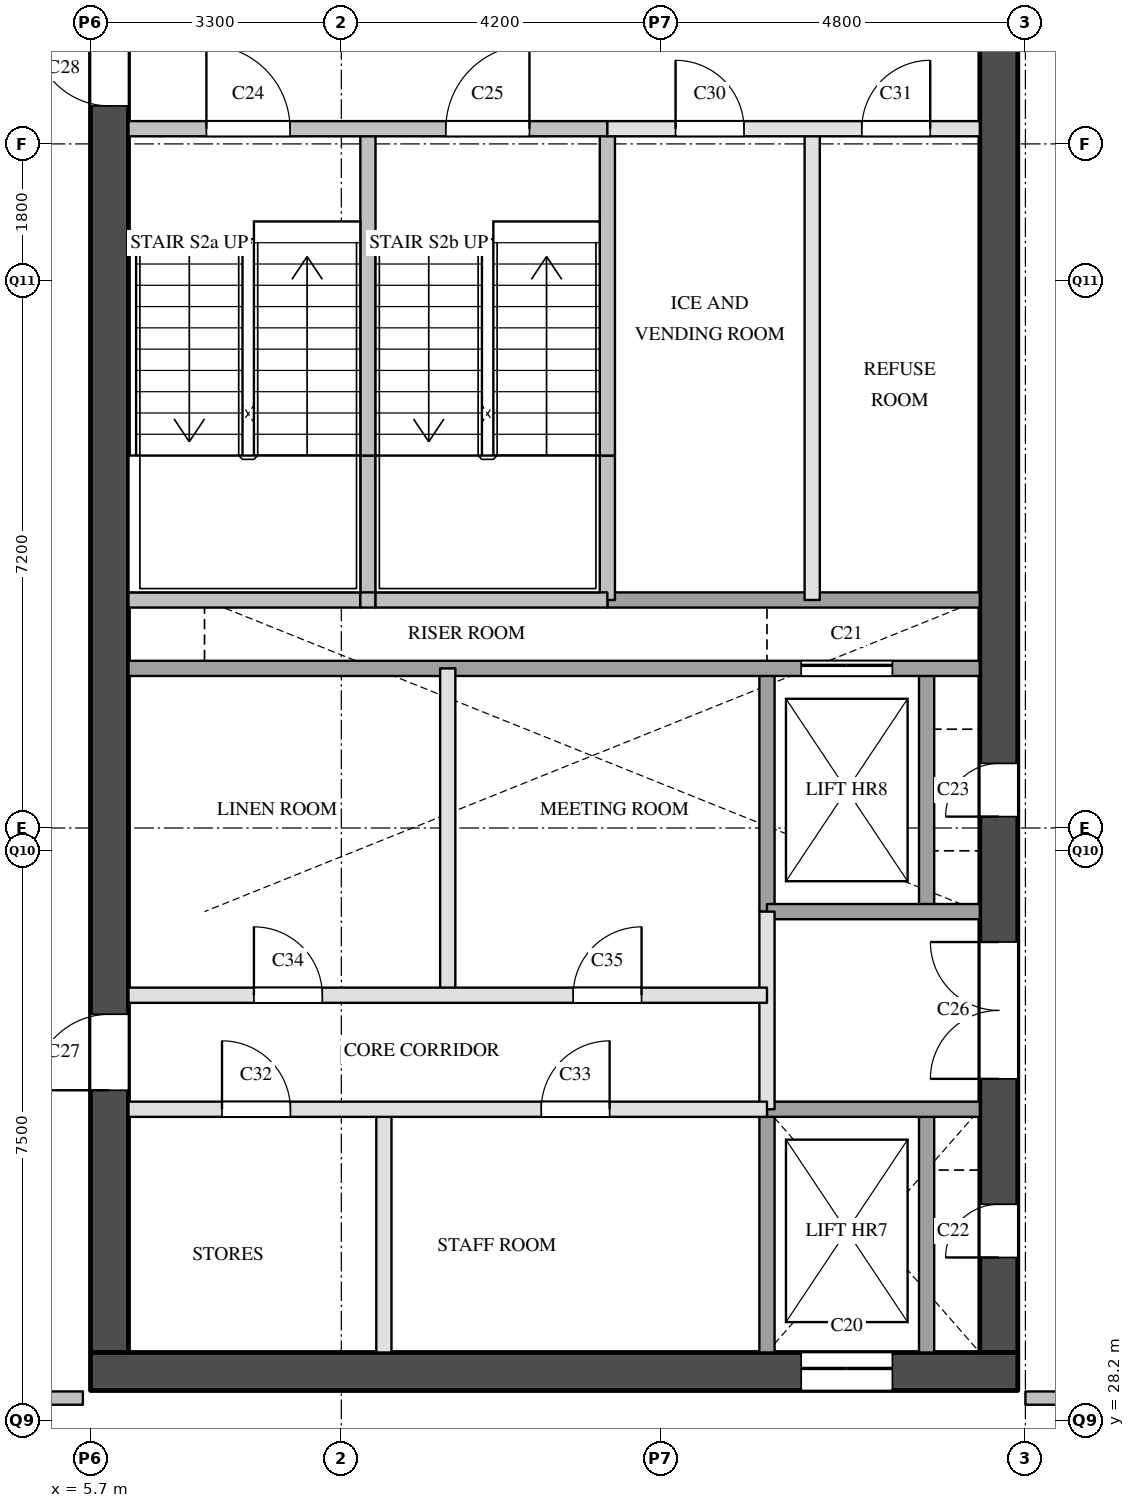
"""IFC4 building model, lengths in metres.
Left out: names, types, materials, properties, quantities, classifications, styles, units other than length and angle.
Written with IfcOpenShell. Run it as: python <this file> out.ifc"""

import sys

from ifc_helpers import new_model, si_unit, direction, frame, frame_2d, origin, place, context, subcontext, project, spatial, rectangle, extrude, element, fill, save


model = new_model("IFC4")
c1 = context("Model", 3, precision=1e-05, world=origin(), true_north=direction((0.0, 1.0)))
c2 = subcontext(c1, "Body", "Model", "MODEL_VIEW")
j1 = project(units=[si_unit("LENGTHUNIT", "METRE"), si_unit("PLANEANGLEUNIT", "RADIAN")], contexts=[c1])
p1 = place(None, origin())
s1 = spatial("IfcSite", under=j1, at=p1, CompositionType="ELEMENT")
p2 = place(p1, origin())
s2 = spatial("IfcBuilding", under=s1, at=p2, CompositionType="ELEMENT")
p3 = place(p2, frame((0.0, 0.0, 134.9)))
s3 = spatial("IfcBuildingStorey", under=s2, at=p3, CompositionType="ELEMENT", Elevation=134.9)
p4 = place(p3, frame((5.7, 28.85, 0.0), z_axis=(0.0, 0.0, 1.0), x_axis=(1.0, 0.0, 0.0)))
e1 = element("IfcWall", 1, at=p4, inside=s3, PredefinedType="SHEAR", context=c2, shape_type="SweptSolid", body=[
    extrude(rectangle(XDim=12.2, YDim=0.5, at=frame_2d((6.1, 0.0))), origin(), (0.0, 0.0, 1.0), 3.6),
])
p5 = place(p4, frame((9.35, 0.0, 0.0)))
e2 = element("IfcOpeningElement", 2, at=p5, cuts=e1, PredefinedType="OPENING", context=c2, shape_type="SweptSolid", body=[
    extrude(rectangle(XDim=1.2, YDim=2.1, at=frame_2d((0.6, 1.05))), frame((0.0, 0.26, 0.0), z_axis=(0.0, -1.0, 0.0), x_axis=(1.0, 0.0, 0.0)), (0.0, 0.0, 1.0), 0.52),
])
p6 = place(p3, frame((5.95, 29.1, 0.0), z_axis=(0.0, 0.0, 1.0), x_axis=(0.0, 1.0, 0.0)))
e3 = element("IfcWall", 3, at=p6, inside=s3, PredefinedType="SHEAR", context=c2, shape_type="SweptSolid", body=[
    extrude(rectangle(XDim=20.3, YDim=0.5, at=frame_2d((10.15, 0.0))), origin(), (0.0, 0.0, 1.0), 3.6),
])
p7 = place(p6, frame((3.45, 0.0, 0.0)))
e4 = element("IfcOpeningElement", 4, at=p7, cuts=e3, PredefinedType="OPENING", context=c2, shape_type="SweptSolid", body=[
    extrude(rectangle(XDim=1.0, YDim=2.1, at=frame_2d((0.5, 1.05))), frame((0.0, 0.26, 0.0), z_axis=(0.0, -1.0, 0.0), x_axis=(1.0, 0.0, 0.0)), (0.0, 0.0, 1.0), 0.52),
])
p8 = place(p6, frame((16.4, 0.0, 0.0)))
e5 = element("IfcOpeningElement", 5, at=p8, cuts=e3, PredefinedType="OPENING", context=c2, shape_type="SweptSolid", body=[
    extrude(rectangle(XDim=1.0, YDim=2.1, at=frame_2d((0.5, 1.05))), frame((0.0, 0.26, 0.0), z_axis=(0.0, -1.0, 0.0), x_axis=(1.0, 0.0, 0.0)), (0.0, 0.0, 1.0), 0.52),
])
p9 = place(p3, frame((17.65, 29.1, 0.0), z_axis=(0.0, 0.0, 1.0), x_axis=(0.0, 1.0, 0.0)))
e6 = element("IfcWall", 6, at=p9, inside=s3, PredefinedType="SHEAR", context=c2, shape_type="SweptSolid", body=[
    extrude(rectangle(XDim=20.3, YDim=0.5, at=frame_2d((10.15, 0.0))), origin(), (0.0, 0.0, 1.0), 3.6),
])
p10 = place(p9, frame((1.25, 0.0, 0.0)))
e7 = element("IfcOpeningElement", 7, at=p10, cuts=e6, PredefinedType="OPENING", context=c2, shape_type="SweptSolid", body=[
    extrude(rectangle(XDim=0.7, YDim=2.1, at=frame_2d((0.35, 1.05))), frame((0.0, 0.26, 0.0), z_axis=(0.0, -1.0, 0.0), x_axis=(1.0, 0.0, 0.0)), (0.0, 0.0, 1.0), 0.52),
])
p11 = place(p9, frame((7.05, 0.0, 0.0)))
e8 = element("IfcOpeningElement", 8, at=p11, cuts=e6, PredefinedType="OPENING", context=c2, shape_type="SweptSolid", body=[
    extrude(rectangle(XDim=0.7, YDim=2.1, at=frame_2d((0.35, 1.05))), frame((0.0, 0.26, 0.0), z_axis=(0.0, -1.0, 0.0), x_axis=(1.0, 0.0, 0.0)), (0.0, 0.0, 1.0), 0.52),
])
p12 = place(p9, frame((3.6, 0.0, 0.0)))
e9 = element("IfcOpeningElement", 9, at=p12, cuts=e6, PredefinedType="OPENING", context=c2, shape_type="SweptSolid", body=[
    extrude(rectangle(XDim=1.8, YDim=2.1, at=frame_2d((0.9, 1.05))), frame((0.0, 0.26, 0.0), z_axis=(0.0, -1.0, 0.0), x_axis=(1.0, 0.0, 0.0)), (0.0, 0.0, 1.0), 0.52),
])
p13 = place(p3, frame((9.35, 39.0, 0.0), z_axis=(0.0, 0.0, 1.0), x_axis=(0.0, 1.0, 0.0)))
e10 = element("IfcWall", 10, at=p13, inside=s3, PredefinedType="SOLIDWALL", context=c2, shape_type="SweptSolid", body=[
    extrude(rectangle(XDim=1.9, YDim=0.2, at=frame_2d((0.95, 0.0))), origin(), (0.0, 0.0, 1.0), 3.6),
])
p14 = place(p3, frame((9.35, 40.9, 0.0), z_axis=(0.0, 0.0, 1.0), x_axis=(0.0, 1.0, 0.0)))
e11 = element("IfcWall", 11, at=p14, inside=s3, PredefinedType="SOLIDWALL", context=c2, shape_type="SweptSolid", body=[
    extrude(rectangle(XDim=4.3, YDim=0.2, at=frame_2d((2.15, 0.0))), origin(), (0.0, 0.0, 1.0), 3.6),
])
p15 = place(p3, frame((9.56, 29.1, 0.0), z_axis=(0.0, 0.0, 1.0), x_axis=(0.0, 1.0, 0.0)))
e12 = element("IfcWall", 12, at=p15, inside=s3, PredefinedType="PARTITIONING", context=c2, shape_type="SweptSolid", body=[
    extrude(rectangle(XDim=3.2, YDim=0.2, at=frame_2d((1.6, 0.0))), origin(), (0.0, 0.0, 1.0), 3.6),
])
p16 = place(p3, frame((10.4, 33.8, 0.0), z_axis=(0.0, 0.0, 1.0), x_axis=(0.0, 1.0, 0.0)))
e13 = element("IfcWall", 13, at=p16, inside=s3, PredefinedType="PARTITIONING", context=c2, shape_type="SweptSolid", body=[
    extrude(rectangle(XDim=4.3, YDim=0.2, at=frame_2d((2.15, 0.0))), origin(), (0.0, 0.0, 1.0), 3.6),
])
p17 = place(p3, frame((12.5, 39.0, 0.0), z_axis=(0.0, 0.0, 1.0), x_axis=(0.0, 1.0, 0.0)))
e14 = element("IfcWall", 14, at=p17, inside=s3, PredefinedType="SOLIDWALL", context=c2, shape_type="SweptSolid", body=[
    extrude(rectangle(XDim=1.9, YDim=0.2, at=frame_2d((0.95, 0.0))), origin(), (0.0, 0.0, 1.0), 3.6),
])
p18 = place(p3, frame((12.5, 40.9, 0.0), z_axis=(0.0, 0.0, 1.0), x_axis=(0.0, 1.0, 0.0)))
e15 = element("IfcWall", 15, at=p18, inside=s3, PredefinedType="SOLIDWALL", context=c2, shape_type="SweptSolid", body=[
    extrude(rectangle(XDim=4.3, YDim=0.2, at=frame_2d((2.15, 0.0))), origin(), (0.0, 0.0, 1.0), 3.6),
])
p19 = place(p3, frame((14.6, 32.3, 0.0), z_axis=(0.0, 0.0, 1.0), x_axis=(0.0, 1.0, 0.0)))
e16 = element("IfcWall", 16, at=p19, inside=s3, PredefinedType="PARTITIONING", context=c2, shape_type="SweptSolid", body=[
    extrude(rectangle(XDim=2.6, YDim=0.2, at=frame_2d((1.3, 0.0))), origin(), (0.0, 0.0, 1.0), 3.6),
])
p20 = place(p3, frame((14.6, 29.1, 0.0), z_axis=(0.0, 0.0, 1.0), x_axis=(0.0, 1.0, 0.0)))
e17 = element("IfcWall", 17, at=p20, inside=s3, PredefinedType="SOLIDWALL", context=c2, shape_type="SweptSolid", body=[
    extrude(rectangle(XDim=3.2, YDim=0.2, at=frame_2d((1.6, 0.0))), origin(), (0.0, 0.0, 1.0), 3.6),
])
p21 = place(p3, frame((14.6, 34.9, 0.0), z_axis=(0.0, 0.0, 1.0), x_axis=(0.0, 1.0, 0.0)))
e18 = element("IfcWall", 18, at=p21, inside=s3, PredefinedType="SOLIDWALL", context=c2, shape_type="SweptSolid", body=[
    extrude(rectangle(XDim=3.2, YDim=0.2, at=frame_2d((1.6, 0.0))), origin(), (0.0, 0.0, 1.0), 3.6),
])
p22 = place(p3, frame((15.195, 39.0, 0.0), z_axis=(0.0, 0.0, 1.0), x_axis=(0.0, 1.0, 0.0)))
e19 = element("IfcWall", 19, at=p22, inside=s3, PredefinedType="PARTITIONING", context=c2, shape_type="SweptSolid", body=[
    extrude(rectangle(XDim=6.2, YDim=0.2, at=frame_2d((3.1, 0.0))), origin(), (0.0, 0.0, 1.0), 3.6),
])
p23 = place(p3, frame((16.7, 29.1, 0.0), z_axis=(0.0, 0.0, 1.0), x_axis=(0.0, 1.0, 0.0)))
e20 = element("IfcWall", 20, at=p23, inside=s3, PredefinedType="SOLIDWALL", context=c2, shape_type="SweptSolid", body=[
    extrude(rectangle(XDim=3.2, YDim=0.2, at=frame_2d((1.6, 0.0))), origin(), (0.0, 0.0, 1.0), 3.6),
])
p24 = place(p3, frame((16.7, 34.9, 0.0), z_axis=(0.0, 0.0, 1.0), x_axis=(0.0, 1.0, 0.0)))
e21 = element("IfcWall", 21, at=p24, inside=s3, PredefinedType="SOLIDWALL", context=c2, shape_type="SweptSolid", body=[
    extrude(rectangle(XDim=3.2, YDim=0.2, at=frame_2d((1.6, 0.0))), origin(), (0.0, 0.0, 1.0), 3.6),
])
p25 = place(p3, frame((6.2, 32.3, 0.0), z_axis=(0.0, 0.0, 1.0), x_axis=(1.0, 0.0, 0.0)))
e22 = element("IfcWall", 22, at=p25, inside=s3, PredefinedType="PARTITIONING", context=c2, shape_type="SweptSolid", body=[
    extrude(rectangle(XDim=8.4, YDim=0.2, at=frame_2d((4.2, 0.0))), origin(), (0.0, 0.0, 1.0), 3.6),
])
p26 = place(p25, frame((1.23, 0.0, 0.0)))
e23 = element("IfcOpeningElement", 23, at=p26, cuts=e22, PredefinedType="OPENING", context=c2, shape_type="SweptSolid", body=[
    extrude(rectangle(XDim=0.9, YDim=2.1, at=frame_2d((0.45, 1.05))), frame((0.0, 0.11, 0.0), z_axis=(0.0, -1.0, 0.0), x_axis=(1.0, 0.0, 0.0)), (0.0, 0.0, 1.0), 0.22),
])
p27 = place(p25, frame((5.43, 0.0, 0.0)))
e24 = element("IfcOpeningElement", 24, at=p27, cuts=e22, PredefinedType="OPENING", context=c2, shape_type="SweptSolid", body=[
    extrude(rectangle(XDim=0.9, YDim=2.1, at=frame_2d((0.45, 1.05))), frame((0.0, 0.11, 0.0), z_axis=(0.0, -1.0, 0.0), x_axis=(1.0, 0.0, 0.0)), (0.0, 0.0, 1.0), 0.22),
])
p28 = place(p3, frame((14.6, 32.3, 0.0), z_axis=(0.0, 0.0, 1.0), x_axis=(1.0, 0.0, 0.0)))
e25 = element("IfcWall", 25, at=p28, inside=s3, PredefinedType="SOLIDWALL", context=c2, shape_type="SweptSolid", body=[
    extrude(rectangle(XDim=2.8, YDim=0.2, at=frame_2d((1.4, 0.0))), origin(), (0.0, 0.0, 1.0), 3.6),
])
p29 = place(p3, frame((6.2, 33.8, 0.0), z_axis=(0.0, 0.0, 1.0), x_axis=(1.0, 0.0, 0.0)))
e26 = element("IfcWall", 26, at=p29, inside=s3, PredefinedType="PARTITIONING", context=c2, shape_type="SweptSolid", body=[
    extrude(rectangle(XDim=8.4, YDim=0.2, at=frame_2d((4.2, 0.0))), origin(), (0.0, 0.0, 1.0), 3.6),
])
p30 = place(p29, frame((1.65, 0.0, 0.0)))
e27 = element("IfcOpeningElement", 27, at=p30, cuts=e26, PredefinedType="OPENING", context=c2, shape_type="SweptSolid", body=[
    extrude(rectangle(XDim=0.9, YDim=2.1, at=frame_2d((0.45, 1.05))), frame((0.0, 0.11, 0.0), z_axis=(0.0, -1.0, 0.0), x_axis=(1.0, 0.0, 0.0)), (0.0, 0.0, 1.0), 0.22),
])
p31 = place(p29, frame((5.85, 0.0, 0.0)))
e28 = element("IfcOpeningElement", 28, at=p31, cuts=e26, PredefinedType="OPENING", context=c2, shape_type="SweptSolid", body=[
    extrude(rectangle(XDim=0.9, YDim=2.1, at=frame_2d((0.45, 1.05))), frame((0.0, 0.11, 0.0), z_axis=(0.0, -1.0, 0.0), x_axis=(1.0, 0.0, 0.0)), (0.0, 0.0, 1.0), 0.22),
])
p32 = place(p3, frame((14.6, 34.9, 0.0), z_axis=(0.0, 0.0, 1.0), x_axis=(1.0, 0.0, 0.0)))
e29 = element("IfcWall", 29, at=p32, inside=s3, PredefinedType="SOLIDWALL", context=c2, shape_type="SweptSolid", body=[
    extrude(rectangle(XDim=2.8, YDim=0.2, at=frame_2d((1.4, 0.0))), origin(), (0.0, 0.0, 1.0), 3.6),
])
p33 = place(p3, frame((6.2, 38.1, 0.0), z_axis=(0.0, 0.0, 1.0), x_axis=(1.0, 0.0, 0.0)))
e30 = element("IfcWall", 30, at=p33, inside=s3, PredefinedType="SOLIDWALL", context=c2, shape_type="SweptSolid", body=[
    extrude(rectangle(XDim=11.2, YDim=0.2, at=frame_2d((5.6, 0.0))), origin(), (0.0, 0.0, 1.0), 3.6),
])
p34 = place(p33, frame((8.85, 0.0, 0.0)))
e31 = element("IfcOpeningElement", 31, at=p34, cuts=e30, PredefinedType="OPENING", context=c2, shape_type="SweptSolid", body=[
    extrude(rectangle(XDim=1.2, YDim=2.1, at=frame_2d((0.6, 1.05))), frame((0.0, 0.11, 0.0), z_axis=(0.0, -1.0, 0.0), x_axis=(1.0, 0.0, 0.0)), (0.0, 0.0, 1.0), 0.22),
])
p35 = place(p3, frame((12.5, 39.0, 0.0), z_axis=(0.0, 0.0, 1.0), x_axis=(1.0, 0.0, 0.0)))
e32 = element("IfcWall", 32, at=p35, inside=s3, PredefinedType="SOLIDWALL", context=c2, shape_type="SweptSolid", body=[
    extrude(rectangle(XDim=4.9, YDim=0.2, at=frame_2d((2.45, 0.0))), origin(), (0.0, 0.0, 1.0), 3.6),
])
p36 = place(p3, frame((6.2, 39.0, 0.0), z_axis=(0.0, 0.0, 1.0), x_axis=(1.0, 0.0, 0.0)))
e33 = element("IfcWall", 33, at=p36, inside=s3, PredefinedType="SOLIDWALL", context=c2, shape_type="SweptSolid", body=[
    extrude(rectangle(XDim=3.05, YDim=0.2, at=frame_2d((1.525, 0.0))), origin(), (0.0, 0.0, 1.0), 3.6),
])
p37 = place(p3, frame((9.25, 39.0, 0.0), z_axis=(0.0, 0.0, 1.0), x_axis=(1.0, 0.0, 0.0)))
e34 = element("IfcWall", 34, at=p37, inside=s3, PredefinedType="SOLIDWALL", context=c2, shape_type="SweptSolid", body=[
    extrude(rectangle(XDim=0.2, YDim=0.2, at=frame_2d((0.1, 0.0))), origin(), (0.0, 0.0, 1.0), 3.6),
])
p38 = place(p3, frame((9.45, 39.0, 0.0), z_axis=(0.0, 0.0, 1.0), x_axis=(1.0, 0.0, 0.0)))
e35 = element("IfcWall", 35, at=p38, inside=s3, PredefinedType="SOLIDWALL", context=c2, shape_type="SweptSolid", body=[
    extrude(rectangle(XDim=3.05, YDim=0.2, at=frame_2d((1.525, 0.0))), origin(), (0.0, 0.0, 1.0), 3.6),
])
p39 = place(p3, frame((12.5, 45.2, 0.0), z_axis=(0.0, 0.0, 1.0), x_axis=(1.0, 0.0, 0.0)))
e36 = element("IfcWall", 36, at=p39, inside=s3, PredefinedType="PARTITIONING", context=c2, shape_type="SweptSolid", body=[
    extrude(rectangle(XDim=4.9, YDim=0.2, at=frame_2d((2.45, 0.0))), origin(), (0.0, 0.0, 1.0), 3.6),
])
p40 = place(p39, frame((0.897, 0.0, 0.0)))
e37 = element("IfcOpeningElement", 37, at=p40, cuts=e36, PredefinedType="OPENING", context=c2, shape_type="SweptSolid", body=[
    extrude(rectangle(XDim=0.9, YDim=2.1, at=frame_2d((0.45, 1.05))), frame((0.0, 0.11, 0.0), z_axis=(0.0, -1.0, 0.0), x_axis=(1.0, 0.0, 0.0)), (0.0, 0.0, 1.0), 0.22),
])
p41 = place(p39, frame((3.347, 0.0, 0.0)))
e38 = element("IfcOpeningElement", 38, at=p41, cuts=e36, PredefinedType="OPENING", context=c2, shape_type="SweptSolid", body=[
    extrude(rectangle(XDim=0.9, YDim=2.1, at=frame_2d((0.45, 1.05))), frame((0.0, 0.11, 0.0), z_axis=(0.0, -1.0, 0.0), x_axis=(1.0, 0.0, 0.0)), (0.0, 0.0, 1.0), 0.22),
])
p42 = place(p3, frame((6.2, 45.2, 0.0), z_axis=(0.0, 0.0, 1.0), x_axis=(1.0, 0.0, 0.0)))
e39 = element("IfcWall", 39, at=p42, inside=s3, PredefinedType="SOLIDWALL", context=c2, shape_type="SweptSolid", body=[
    extrude(rectangle(XDim=6.3, YDim=0.2, at=frame_2d((3.15, 0.0))), origin(), (0.0, 0.0, 1.0), 3.6),
])
p43 = place(p42, frame((1.025, 0.0, 0.0)))
e40 = element("IfcOpeningElement", 40, at=p43, cuts=e39, PredefinedType="OPENING", context=c2, shape_type="SweptSolid", body=[
    extrude(rectangle(XDim=1.1, YDim=2.1, at=frame_2d((0.55, 1.05))), frame((0.0, 0.11, 0.0), z_axis=(0.0, -1.0, 0.0), x_axis=(1.0, 0.0, 0.0)), (0.0, 0.0, 1.0), 0.22),
])
p44 = place(p42, frame((4.175, 0.0, 0.0)))
e41 = element("IfcOpeningElement", 41, at=p44, cuts=e39, PredefinedType="OPENING", context=c2, shape_type="SweptSolid", body=[
    extrude(rectangle(XDim=1.1, YDim=2.1, at=frame_2d((0.55, 1.05))), frame((0.0, 0.11, 0.0), z_axis=(0.0, -1.0, 0.0), x_axis=(1.0, 0.0, 0.0)), (0.0, 0.0, 1.0), 0.22),
])
for number, where, z_axis, x_axis in (
    (42, (4.1, 28.5, 0.0), (0.0, 0.0, 1.0), (1.0, 0.0, 0.0)),
    (43, (18.0, 28.5, 0.0), (0.0, 0.0, 1.0), (1.0, 0.0, 0.0)),
):
    element("IfcWall", number, at=place(p3, frame(where, z_axis=z_axis, x_axis=x_axis)), inside=s3, PredefinedType="PARTITIONING", context=c2, shape_type="SweptSolid", body=[
        extrude(rectangle(XDim=1.5, YDim=0.175, at=frame_2d((0.75, 0.0))), origin(), (0.0, 0.0, 1.0), 3.6),
    ])
p45 = place(p5, origin())
e44 = element("IfcDoor", 44, at=p45, inside=s3, OperationType="SLIDING_TO_LEFT", PredefinedType="DOOR", context=c2, shape_type="SweptSolid", body=[
    extrude(rectangle(XDim=1.2, YDim=2.1, at=frame_2d((0.6, 1.05))), frame((0.0, 0.025, 0.0), z_axis=(0.0, -1.0, 0.0), x_axis=(1.0, 0.0, 0.0)), (0.0, 0.0, 1.0), 0.05),
])
fill(e2, e44)
p46 = place(p34, origin())
e45 = element("IfcDoor", 45, at=p46, inside=s3, OperationType="SLIDING_TO_LEFT", PredefinedType="DOOR", context=c2, shape_type="SweptSolid", body=[
    extrude(rectangle(XDim=1.2, YDim=2.1, at=frame_2d((0.6, 1.05))), frame((0.0, 0.025, 0.0), z_axis=(0.0, -1.0, 0.0), x_axis=(1.0, 0.0, 0.0)), (0.0, 0.0, 1.0), 0.05),
])
fill(e31, e45)
p47 = place(p10, origin())
e46 = element("IfcDoor", 46, at=p47, inside=s3, OperationType="SINGLE_SWING_LEFT", PredefinedType="DOOR", context=c2, shape_type="SweptSolid", body=[
    extrude(rectangle(XDim=0.7, YDim=2.1, at=frame_2d((0.35, 1.05))), frame((0.0, 0.025, 0.0), z_axis=(0.0, -1.0, 0.0), x_axis=(1.0, 0.0, 0.0)), (0.0, 0.0, 1.0), 0.05),
])
fill(e7, e46)
p48 = place(p11, origin())
e47 = element("IfcDoor", 47, at=p48, inside=s3, OperationType="SINGLE_SWING_LEFT", PredefinedType="DOOR", context=c2, shape_type="SweptSolid", body=[
    extrude(rectangle(XDim=0.7, YDim=2.1, at=frame_2d((0.35, 1.05))), frame((0.0, 0.025, 0.0), z_axis=(0.0, -1.0, 0.0), x_axis=(1.0, 0.0, 0.0)), (0.0, 0.0, 1.0), 0.05),
])
fill(e8, e47)
p49 = place(p43, origin())
e48 = element("IfcDoor", 48, at=p49, inside=s3, OperationType="SINGLE_SWING_LEFT", PredefinedType="DOOR", context=c2, shape_type="SweptSolid", body=[
    extrude(rectangle(XDim=1.1, YDim=2.1, at=frame_2d((0.55, 1.05))), frame((0.0, 0.025, 0.0), z_axis=(0.0, -1.0, 0.0), x_axis=(1.0, 0.0, 0.0)), (0.0, 0.0, 1.0), 0.05),
])
fill(e40, e48)
p50 = place(p44, origin())
e49 = element("IfcDoor", 49, at=p50, inside=s3, OperationType="SINGLE_SWING_RIGHT", PredefinedType="DOOR", context=c2, shape_type="SweptSolid", body=[
    extrude(rectangle(XDim=1.1, YDim=2.1, at=frame_2d((0.55, 1.05))), frame((0.0, 0.025, 0.0), z_axis=(0.0, -1.0, 0.0), x_axis=(1.0, 0.0, 0.0)), (0.0, 0.0, 1.0), 0.05),
])
fill(e41, e49)
p51 = place(p12, origin())
e50 = element("IfcDoor", 50, at=p51, inside=s3, OperationType="DOUBLE_DOOR_SINGLE_SWING", PredefinedType="DOOR", context=c2, shape_type="SweptSolid", body=[
    extrude(rectangle(XDim=1.8, YDim=2.1, at=frame_2d((0.9, 1.05))), frame((0.0, 0.025, 0.0), z_axis=(0.0, -1.0, 0.0), x_axis=(1.0, 0.0, 0.0)), (0.0, 0.0, 1.0), 0.05),
])
fill(e9, e50)
p52 = place(p7, origin())
e51 = element("IfcDoor", 51, at=p52, inside=s3, OperationType="SINGLE_SWING_LEFT", PredefinedType="DOOR", context=c2, shape_type="SweptSolid", body=[
    extrude(rectangle(XDim=1.0, YDim=2.1, at=frame_2d((0.5, 1.05))), frame((0.0, 0.025, 0.0), z_axis=(0.0, -1.0, 0.0), x_axis=(1.0, 0.0, 0.0)), (0.0, 0.0, 1.0), 0.05),
])
fill(e4, e51)
p53 = place(p8, origin())
e52 = element("IfcDoor", 52, at=p53, inside=s3, OperationType="SINGLE_SWING_RIGHT", PredefinedType="DOOR", context=c2, shape_type="SweptSolid", body=[
    extrude(rectangle(XDim=1.0, YDim=2.1, at=frame_2d((0.5, 1.05))), frame((0.0, 0.025, 0.0), z_axis=(0.0, -1.0, 0.0), x_axis=(1.0, 0.0, 0.0)), (0.0, 0.0, 1.0), 0.05),
])
fill(e5, e52)
p54 = place(p40, origin())
e53 = element("IfcDoor", 53, at=p54, inside=s3, OperationType="SINGLE_SWING_LEFT", PredefinedType="DOOR", context=c2, shape_type="SweptSolid", body=[
    extrude(rectangle(XDim=0.9, YDim=2.1, at=frame_2d((0.45, 1.05))), frame((0.0, 0.025, 0.0), z_axis=(0.0, -1.0, 0.0), x_axis=(1.0, 0.0, 0.0)), (0.0, 0.0, 1.0), 0.05),
])
fill(e37, e53)
p55 = place(p41, origin())
e54 = element("IfcDoor", 54, at=p55, inside=s3, OperationType="SINGLE_SWING_RIGHT", PredefinedType="DOOR", context=c2, shape_type="SweptSolid", body=[
    extrude(rectangle(XDim=0.9, YDim=2.1, at=frame_2d((0.45, 1.05))), frame((0.0, 0.025, 0.0), z_axis=(0.0, -1.0, 0.0), x_axis=(1.0, 0.0, 0.0)), (0.0, 0.0, 1.0), 0.05),
])
fill(e38, e54)
p56 = place(p26, origin())
e55 = element("IfcDoor", 55, at=p56, inside=s3, OperationType="SINGLE_SWING_LEFT", PredefinedType="DOOR", context=c2, shape_type="SweptSolid", body=[
    extrude(rectangle(XDim=0.9, YDim=2.1, at=frame_2d((0.45, 1.05))), frame((0.0, 0.025, 0.0), z_axis=(0.0, -1.0, 0.0), x_axis=(1.0, 0.0, 0.0)), (0.0, 0.0, 1.0), 0.05),
])
fill(e23, e55)
p57 = place(p27, origin())
e56 = element("IfcDoor", 56, at=p57, inside=s3, OperationType="SINGLE_SWING_RIGHT", PredefinedType="DOOR", context=c2, shape_type="SweptSolid", body=[
    extrude(rectangle(XDim=0.9, YDim=2.1, at=frame_2d((0.45, 1.05))), frame((0.0, 0.025, 0.0), z_axis=(0.0, -1.0, 0.0), x_axis=(1.0, 0.0, 0.0)), (0.0, 0.0, 1.0), 0.05),
])
fill(e24, e56)
p58 = place(p30, origin())
e57 = element("IfcDoor", 57, at=p58, inside=s3, OperationType="SINGLE_SWING_LEFT", PredefinedType="DOOR", context=c2, shape_type="SweptSolid", body=[
    extrude(rectangle(XDim=0.9, YDim=2.1, at=frame_2d((0.45, 1.05))), frame((0.0, 0.025, 0.0), z_axis=(0.0, -1.0, 0.0), x_axis=(1.0, 0.0, 0.0)), (0.0, 0.0, 1.0), 0.05),
])
fill(e27, e57)
p59 = place(p31, origin())
e58 = element("IfcDoor", 58, at=p59, inside=s3, OperationType="SINGLE_SWING_RIGHT", PredefinedType="DOOR", context=c2, shape_type="SweptSolid", body=[
    extrude(rectangle(XDim=0.9, YDim=2.1, at=frame_2d((0.45, 1.05))), frame((0.0, 0.025, 0.0), z_axis=(0.0, -1.0, 0.0), x_axis=(1.0, 0.0, 0.0)), (0.0, 0.0, 1.0), 0.05),
])
fill(e28, e58)
save(model, sys.argv[1])
